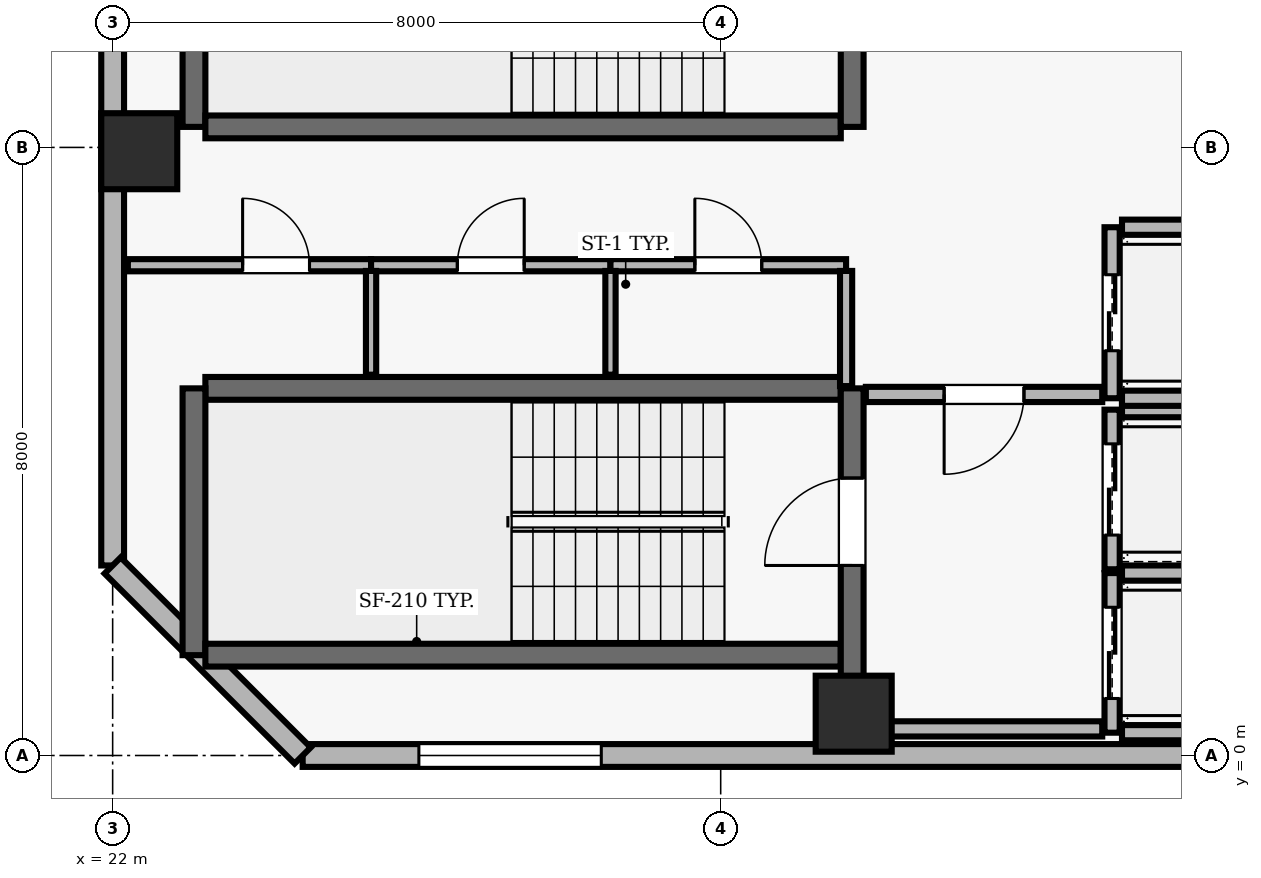
"""IFC4 building model, lengths in metres.
Left out: names, types, materials, properties, quantities, classifications, styles, units other than length and angle.
Written with IfcOpenShell. Run it as: python <this file> out.ifc"""

import sys

from ifc_helpers import new_model, si_unit, direction, frame, frame_2d, origin, origin_2d, place, context, subcontext, project, spatial, rectangle, extrude, element, fill, save


model = new_model("IFC4")
c1 = context("Model", 3, precision=1e-05, world=origin(), true_north=direction((0.0, 1.0)))
c2 = subcontext(c1, "Body", "Model", "MODEL_VIEW")
j1 = project(units=[si_unit("LENGTHUNIT", "METRE"), si_unit("PLANEANGLEUNIT", "RADIAN")], contexts=[c1])
p1 = place(None, origin())
s1 = spatial("IfcSite", under=j1, at=p1, CompositionType="ELEMENT")
p2 = place(p1, origin())
s2 = spatial("IfcBuilding", under=s1, at=p2, CompositionType="ELEMENT")
p3 = place(p2, frame((0.0, 0.0, 214.8)))
s3 = spatial("IfcBuildingStorey", under=s2, at=p3, CompositionType="ELEMENT", Elevation=214.8)
for number, where, z_axis, x_axis in (
    (1, (31.75, 0.55, 0.0), (0.0, 0.0, 1.0), (1.0, 0.0, 0.0)),
    (2, (22.35, 7.95, 0.0), (0.0, 0.0, 1.0), (1.0, 0.0, 0.0)),
):
    element("IfcColumn", number, at=place(p3, frame(where, z_axis=z_axis, x_axis=x_axis)), inside=s3, PredefinedType="COLUMN", context=c2, shape_type="SweptSolid", body=[
        extrude(rectangle(XDim=1.0, YDim=1.0, at=origin_2d()), origin(), (0.0, 0.0, 1.0), 3.9),
    ])
p4 = place(p3, frame((24.5, 0.0, 0.0), z_axis=(0.0, 0.0, 1.0), x_axis=(1.0, 0.0, 0.0)))
e3 = element("IfcWall", 3, at=p4, inside=s3, PredefinedType="SOLIDWALL", context=c2, shape_type="SweptSolid", body=[
    extrude(rectangle(XDim=38.2, YDim=0.3, at=frame_2d((19.1, 0.0))), origin(), (0.0, 0.0, 1.0), 3.69),
])
p5 = place(p4, frame((1.529, 0.0, 0.9)))
e4 = element("IfcOpeningElement", 4, at=p5, cuts=e3, PredefinedType="OPENING", context=c2, shape_type="SweptSolid", body=[
    extrude(rectangle(XDim=2.4, YDim=1.6, at=frame_2d((1.2, 0.8))), frame((0.0, 0.16, 0.0), z_axis=(0.0, -1.0, 0.0), x_axis=(1.0, 0.0, 0.0)), (0.0, 0.0, 1.0), 0.32),
])
p6 = place(p4, frame((17.9, 0.0, 0.9)))
e5 = element("IfcOpeningElement", 5, at=p6, cuts=e3, PredefinedType="OPENING", context=c2, shape_type="SweptSolid", body=[
    extrude(rectangle(XDim=2.4, YDim=1.6, at=frame_2d((1.2, 0.8))), frame((0.0, 0.16, 0.0), z_axis=(0.0, -1.0, 0.0), x_axis=(1.0, 0.0, 0.0)), (0.0, 0.0, 1.0), 0.32),
])
p7 = place(p4, frame((28.814, 0.0, 0.9)))
e6 = element("IfcOpeningElement", 6, at=p7, cuts=e3, PredefinedType="OPENING", context=c2, shape_type="SweptSolid", body=[
    extrude(rectangle(XDim=2.4, YDim=1.6, at=frame_2d((1.2, 0.8))), frame((0.0, 0.16, 0.0), z_axis=(0.0, -1.0, 0.0), x_axis=(1.0, 0.0, 0.0)), (0.0, 0.0, 1.0), 0.32),
])
p8 = place(p4, frame((34.271, 0.0, 0.9)))
e7 = element("IfcOpeningElement", 7, at=p8, cuts=e3, PredefinedType="OPENING", context=c2, shape_type="SweptSolid", body=[
    extrude(rectangle(XDim=2.4, YDim=1.6, at=frame_2d((1.2, 0.8))), frame((0.0, 0.16, 0.0), z_axis=(0.0, -1.0, 0.0), x_axis=(1.0, 0.0, 0.0)), (0.0, 0.0, 1.0), 0.32),
])
p9 = place(p3, frame((22.0, 40.7, 0.0), z_axis=(0.0, 0.0, 1.0), x_axis=(0.0, -1.0, 0.0)))
e8 = element("IfcWall", 8, at=p9, inside=s3, PredefinedType="SOLIDWALL", context=c2, shape_type="SweptSolid", body=[
    extrude(rectangle(XDim=38.2, YDim=0.3, at=frame_2d((19.1, 0.0))), origin(), (0.0, 0.0, 1.0), 3.69),
])
p10 = place(p9, frame((7.8, 0.0, 0.0)))
e9 = element("IfcOpeningElement", 9, at=p10, cuts=e8, PredefinedType="OPENING", context=c2, shape_type="SweptSolid", body=[
    extrude(rectangle(XDim=1.0, YDim=2.2, at=frame_2d((0.5, 1.1))), frame((0.0, 0.16, 0.0), z_axis=(0.0, -1.0, 0.0), x_axis=(1.0, 0.0, 0.0)), (0.0, 0.0, 1.0), 0.32),
])
p11 = place(p9, frame((1.529, 0.0, 0.9)))
e10 = element("IfcOpeningElement", 10, at=p11, cuts=e8, PredefinedType="OPENING", context=c2, shape_type="SweptSolid", body=[
    extrude(rectangle(XDim=2.4, YDim=1.6, at=frame_2d((1.2, 0.8))), frame((0.0, 0.16, 0.0), z_axis=(0.0, -1.0, 0.0), x_axis=(1.0, 0.0, 0.0)), (0.0, 0.0, 1.0), 0.32),
])
p12 = place(p9, frame((11.543, 0.0, 0.9)))
e11 = element("IfcOpeningElement", 11, at=p12, cuts=e8, PredefinedType="OPENING", context=c2, shape_type="SweptSolid", body=[
    extrude(rectangle(XDim=2.4, YDim=1.6, at=frame_2d((1.2, 0.8))), frame((0.0, 0.16, 0.0), z_axis=(0.0, -1.0, 0.0), x_axis=(1.0, 0.0, 0.0)), (0.0, 0.0, 1.0), 0.32),
])
p13 = place(p9, frame((18.35, 0.0, 0.9)))
e12 = element("IfcOpeningElement", 12, at=p13, cuts=e8, PredefinedType="OPENING", context=c2, shape_type="SweptSolid", body=[
    extrude(rectangle(XDim=2.4, YDim=1.6, at=frame_2d((1.2, 0.8))), frame((0.0, 0.16, 0.0), z_axis=(0.0, -1.0, 0.0), x_axis=(1.0, 0.0, 0.0)), (0.0, 0.0, 1.0), 0.32),
])
p14 = place(p9, frame((22.907, 0.0, 0.9)))
e13 = element("IfcOpeningElement", 13, at=p14, cuts=e8, PredefinedType="OPENING", context=c2, shape_type="SweptSolid", body=[
    extrude(rectangle(XDim=2.4, YDim=1.6, at=frame_2d((1.2, 0.8))), frame((0.0, 0.16, 0.0), z_axis=(0.0, -1.0, 0.0), x_axis=(1.0, 0.0, 0.0)), (0.0, 0.0, 1.0), 0.32),
])
p15 = place(p9, frame((28.814, 0.0, 0.9)))
e14 = element("IfcOpeningElement", 14, at=p15, cuts=e8, PredefinedType="OPENING", context=c2, shape_type="SweptSolid", body=[
    extrude(rectangle(XDim=2.4, YDim=1.6, at=frame_2d((1.2, 0.8))), frame((0.0, 0.16, 0.0), z_axis=(0.0, -1.0, 0.0), x_axis=(1.0, 0.0, 0.0)), (0.0, 0.0, 1.0), 0.32),
])
p16 = place(p3, frame((22.0, 2.5, 0.0), z_axis=(0.0, 0.0, 1.0), x_axis=(0.707106781187, -0.707106781187, 0.0)))
e15 = element("IfcWall", 15, at=p16, inside=s3, PredefinedType="SOLIDWALL", context=c2, shape_type="SweptSolid", body=[
    extrude(rectangle(XDim=3.536, YDim=0.3, at=frame_2d((1.768, 0.0))), origin(), (0.0, 0.0, 1.0), 3.69),
])
p17 = place(p3, frame((31.58, 4.83, 0.0), z_axis=(0.0, 0.0, 1.0), x_axis=(-1.0, 0.0, 0.0)))
e16 = element("IfcWall", 16, at=p17, inside=s3, PredefinedType="SHEAR", context=c2, shape_type="SweptSolid", body=[
    extrude(rectangle(XDim=8.36, YDim=0.3, at=frame_2d((4.18, 0.0))), origin(), (0.0, 0.0, 1.0), 3.69),
])
p18 = place(p3, frame((23.07, 4.83, 0.0), z_axis=(0.0, 0.0, 1.0), x_axis=(0.0, -1.0, 0.0)))
e17 = element("IfcWall", 17, at=p18, inside=s3, PredefinedType="SHEAR", context=c2, shape_type="SweptSolid", body=[
    extrude(rectangle(XDim=3.51, YDim=0.3, at=frame_2d((1.755, 0.0))), origin(), (0.0, 0.0, 1.0), 3.69),
])
p19 = place(p3, frame((23.22, 1.32, 0.0), z_axis=(0.0, 0.0, 1.0), x_axis=(1.0, 0.0, 0.0)))
e18 = element("IfcWall", 18, at=p19, inside=s3, PredefinedType="SHEAR", context=c2, shape_type="SweptSolid", body=[
    extrude(rectangle(XDim=8.36, YDim=0.3, at=frame_2d((4.18, 0.0))), origin(), (0.0, 0.0, 1.0), 3.69),
])
p20 = place(p3, frame((31.73, 0.96, 0.0), z_axis=(0.0, 0.0, 1.0), x_axis=(0.0, 1.0, 0.0)))
e19 = element("IfcWall", 19, at=p20, inside=s3, PredefinedType="SHEAR", context=c2, shape_type="SweptSolid", body=[
    extrude(rectangle(XDim=3.87, YDim=0.3, at=frame_2d((1.935, 0.0))), origin(), (0.0, 0.0, 1.0), 3.69),
])
p21 = place(p20, frame((1.54, 0.0, 0.0)))
e20 = element("IfcOpeningElement", 20, at=p21, cuts=e19, PredefinedType="OPENING", context=c2, shape_type="SweptSolid", body=[
    extrude(rectangle(XDim=1.15, YDim=2.15, at=frame_2d((0.575, 1.075))), frame((0.0, 0.16, 0.0), z_axis=(0.0, -1.0, 0.0), x_axis=(1.0, 0.0, 0.0)), (0.0, 0.0, 1.0), 0.32),
])
p22 = place(p3, frame((23.07, 11.78, 0.0), z_axis=(0.0, 0.0, 1.0), x_axis=(0.0, -1.0, 0.0)))
e21 = element("IfcWall", 21, at=p22, inside=s3, PredefinedType="SHEAR", context=c2, shape_type="SweptSolid", body=[
    extrude(rectangle(XDim=3.51, YDim=0.3, at=frame_2d((1.755, 0.0))), origin(), (0.0, 0.0, 1.0), 3.69),
])
p23 = place(p3, frame((23.22, 8.27, 0.0), z_axis=(0.0, 0.0, 1.0), x_axis=(1.0, 0.0, 0.0)))
e22 = element("IfcWall", 22, at=p23, inside=s3, PredefinedType="SHEAR", context=c2, shape_type="SweptSolid", body=[
    extrude(rectangle(XDim=8.36, YDim=0.3, at=frame_2d((4.18, 0.0))), origin(), (0.0, 0.0, 1.0), 3.69),
])
p24 = place(p3, frame((31.73, 8.27, 0.0), z_axis=(0.0, 0.0, 1.0), x_axis=(0.0, 1.0, 0.0)))
e23 = element("IfcWall", 23, at=p24, inside=s3, PredefinedType="SHEAR", context=c2, shape_type="SweptSolid", body=[
    extrude(rectangle(XDim=3.51, YDim=0.3, at=frame_2d((1.755, 0.0))), origin(), (0.0, 0.0, 1.0), 3.69),
])
p25 = place(p24, frame((1.18, 0.0, 0.0)))
e24 = element("IfcOpeningElement", 24, at=p25, cuts=e23, PredefinedType="OPENING", context=c2, shape_type="SweptSolid", body=[
    extrude(rectangle(XDim=1.15, YDim=2.15, at=frame_2d((0.575, 1.075))), frame((0.0, 0.16, 0.0), z_axis=(0.0, -1.0, 0.0), x_axis=(1.0, 0.0, 0.0)), (0.0, 0.0, 1.0), 0.32),
])
p26 = place(p3, frame((35.15, 2.4, 0.0), z_axis=(0.0, 0.0, 1.0), x_axis=(0.0, -1.0, 0.0)))
e25 = element("IfcWall", 25, at=p26, inside=s3, PredefinedType="SOLIDWALL", context=c2, shape_type="SweptSolid", body=[
    extrude(rectangle(XDim=2.1, YDim=0.2, at=frame_2d((1.05, 0.0))), origin(), (0.0, 0.0, 1.0), 3.69),
])
p27 = place(p26, frame((0.45, 0.0, 0.0)))
e26 = element("IfcOpeningElement", 26, at=p27, cuts=e25, PredefinedType="OPENING", context=c2, shape_type="SweptSolid", body=[
    extrude(rectangle(XDim=1.2, YDim=2.15, at=frame_2d((0.6, 1.075))), frame((0.0, 0.11, 0.0), z_axis=(0.0, -1.0, 0.0), x_axis=(1.0, 0.0, 0.0)), (0.0, 0.0, 1.0), 0.22),
])
for number, where, z_axis, x_axis in (
    (27, (35.28, 0.3, 0.0), (0.0, 0.0, 1.0), (1.0, 0.0, 0.0)),
    (28, (37.42, 2.4, 0.0), (0.0, 0.0, 1.0), (-1.0, 0.0, 0.0)),
):
    element("IfcWall", number, at=place(p3, frame(where, z_axis=z_axis, x_axis=x_axis)), inside=s3, PredefinedType="SOLIDWALL", context=c2, shape_type="SweptSolid", body=[
        extrude(rectangle(XDim=2.14, YDim=0.2, at=frame_2d((1.07, 0.0))), origin(), (0.0, 0.0, 1.0), 3.69),
    ])
p28 = place(p3, frame((35.15, 4.55, 0.0), z_axis=(0.0, 0.0, 1.0), x_axis=(0.0, -1.0, 0.0)))
e29 = element("IfcWall", 29, at=p28, inside=s3, PredefinedType="SOLIDWALL", context=c2, shape_type="SweptSolid", body=[
    extrude(rectangle(XDim=2.1, YDim=0.2, at=frame_2d((1.05, 0.0))), origin(), (0.0, 0.0, 1.0), 3.69),
])
p29 = place(p28, frame((0.45, 0.0, 0.0)))
e30 = element("IfcOpeningElement", 30, at=p29, cuts=e29, PredefinedType="OPENING", context=c2, shape_type="SweptSolid", body=[
    extrude(rectangle(XDim=1.2, YDim=2.15, at=frame_2d((0.6, 1.075))), frame((0.0, 0.11, 0.0), z_axis=(0.0, -1.0, 0.0), x_axis=(1.0, 0.0, 0.0)), (0.0, 0.0, 1.0), 0.22),
])
p30 = place(p3, frame((37.42, 4.55, 0.0), z_axis=(0.0, 0.0, 1.0), x_axis=(-1.0, 0.0, 0.0)))
e31 = element("IfcWall", 31, at=p30, inside=s3, PredefinedType="SOLIDWALL", context=c2, shape_type="SweptSolid", body=[
    extrude(rectangle(XDim=2.14, YDim=0.2, at=frame_2d((1.07, 0.0))), origin(), (0.0, 0.0, 1.0), 3.69),
])
p31 = place(p3, frame((35.15, 6.95, 0.0), z_axis=(0.0, 0.0, 1.0), x_axis=(0.0, -1.0, 0.0)))
e32 = element("IfcWall", 32, at=p31, inside=s3, PredefinedType="SOLIDWALL", context=c2, shape_type="SweptSolid", body=[
    extrude(rectangle(XDim=2.25, YDim=0.2, at=frame_2d((1.125, 0.0))), origin(), (0.0, 0.0, 1.0), 3.69),
])
p32 = place(p31, frame((0.625, 0.0, 0.0)))
e33 = element("IfcOpeningElement", 33, at=p32, cuts=e32, PredefinedType="OPENING", context=c2, shape_type="SweptSolid", body=[
    extrude(rectangle(XDim=1.0, YDim=2.1, at=frame_2d((0.5, 1.05))), frame((0.0, 0.11, 0.0), z_axis=(0.0, -1.0, 0.0), x_axis=(1.0, 0.0, 0.0)), (0.0, 0.0, 1.0), 0.22),
])
for number, where, z_axis, x_axis in (
    (34, (35.28, 4.7, 0.0), (0.0, 0.0, 1.0), (1.0, 0.0, 0.0)),
    (35, (37.42, 6.95, 0.0), (0.0, 0.0, 1.0), (-1.0, 0.0, 0.0)),
):
    element("IfcWall", number, at=place(p3, frame(where, z_axis=z_axis, x_axis=x_axis)), inside=s3, PredefinedType="SOLIDWALL", context=c2, shape_type="SweptSolid", body=[
        extrude(rectangle(XDim=2.14, YDim=0.2, at=frame_2d((1.07, 0.0))), origin(), (0.0, 0.0, 1.0), 3.69),
    ])
p33 = place(p3, frame((22.2, 6.45, 0.0), z_axis=(0.0, 0.0, 1.0), x_axis=(1.0, 0.0, 0.0)))
e36 = element("IfcWall", 36, at=p33, inside=s3, PredefinedType="PARTITIONING", context=c2, shape_type="SweptSolid", body=[
    extrude(rectangle(XDim=3.2, YDim=0.16, at=frame_2d((1.6, 0.0))), origin(), (0.0, 0.0, 1.0), 3.69),
])
p34 = place(p33, frame((1.51, 0.0, 0.0)))
e37 = element("IfcOpeningElement", 37, at=p34, cuts=e36, PredefinedType="OPENING", context=c2, shape_type="SweptSolid", body=[
    extrude(rectangle(XDim=0.88, YDim=2.1, at=frame_2d((0.44, 1.05))), frame((0.0, 0.09, 0.0), z_axis=(0.0, -1.0, 0.0), x_axis=(1.0, 0.0, 0.0)), (0.0, 0.0, 1.0), 0.18),
])
p35 = place(p3, frame((25.4, 6.45, 0.0), z_axis=(0.0, 0.0, 1.0), x_axis=(1.0, 0.0, 0.0)))
e38 = element("IfcWall", 38, at=p35, inside=s3, PredefinedType="PARTITIONING", context=c2, shape_type="SweptSolid", body=[
    extrude(rectangle(XDim=3.15, YDim=0.16, at=frame_2d((1.575, 0.0))), origin(), (0.0, 0.0, 1.0), 3.69),
])
p36 = place(p35, frame((1.135, 0.0, 0.0)))
e39 = element("IfcOpeningElement", 39, at=p36, cuts=e38, PredefinedType="OPENING", context=c2, shape_type="SweptSolid", body=[
    extrude(rectangle(XDim=0.88, YDim=2.1, at=frame_2d((0.44, 1.05))), frame((0.0, 0.09, 0.0), z_axis=(0.0, -1.0, 0.0), x_axis=(1.0, 0.0, 0.0)), (0.0, 0.0, 1.0), 0.18),
])
p37 = place(p3, frame((28.55, 6.45, 0.0), z_axis=(0.0, 0.0, 1.0), x_axis=(1.0, 0.0, 0.0)))
e40 = element("IfcWall", 40, at=p37, inside=s3, PredefinedType="PARTITIONING", context=c2, shape_type="SweptSolid", body=[
    extrude(rectangle(XDim=3.1, YDim=0.16, at=frame_2d((1.55, 0.0))), origin(), (0.0, 0.0, 1.0), 3.69),
])
p38 = place(p37, frame((1.11, 0.0, 0.0)))
e41 = element("IfcOpeningElement", 41, at=p38, cuts=e40, PredefinedType="OPENING", context=c2, shape_type="SweptSolid", body=[
    extrude(rectangle(XDim=0.88, YDim=2.1, at=frame_2d((0.44, 1.05))), frame((0.0, 0.09, 0.0), z_axis=(0.0, -1.0, 0.0), x_axis=(1.0, 0.0, 0.0)), (0.0, 0.0, 1.0), 0.18),
])
p39 = place(p3, frame((31.65, 0.35, 0.0), z_axis=(0.0, 0.0, 1.0), x_axis=(1.0, 0.0, 0.0)))
e42 = element("IfcWall", 42, at=p39, inside=s3, PredefinedType="SOLIDWALL", context=c2, shape_type="SweptSolid", body=[
    extrude(rectangle(XDim=3.37, YDim=0.2, at=frame_2d((1.685, 0.0))), origin(), (0.0, 0.0, 1.0), 3.69),
])
p40 = place(p3, frame((35.02, 4.75, 0.0), z_axis=(0.0, 0.0, 1.0), x_axis=(-1.0, 0.0, 0.0)))
e43 = element("IfcWall", 43, at=p40, inside=s3, PredefinedType="SOLIDWALL", context=c2, shape_type="SweptSolid", body=[
    extrude(rectangle(XDim=3.11, YDim=0.2, at=frame_2d((1.555, 0.0))), origin(), (0.0, 0.0, 1.0), 3.69),
])
p41 = place(p40, frame((1.03, 0.0, 0.0)))
e44 = element("IfcOpeningElement", 44, at=p41, cuts=e43, PredefinedType="OPENING", context=c2, shape_type="SweptSolid", body=[
    extrude(rectangle(XDim=1.05, YDim=2.15, at=frame_2d((0.525, 1.075))), frame((0.0, 0.11, 0.0), z_axis=(0.0, -1.0, 0.0), x_axis=(1.0, 0.0, 0.0)), (0.0, 0.0, 1.0), 0.22),
])
for number, where, z_axis, x_axis in (
    (45, (25.4, 5.01, 0.0), (0.0, 0.0, 1.0), (0.0, 1.0, 0.0)),
    (46, (28.55, 5.01, 0.0), (0.0, 0.0, 1.0), (0.0, 1.0, 0.0)),
):
    element("IfcWall", number, at=place(p3, frame(where, z_axis=z_axis, x_axis=x_axis)), inside=s3, PredefinedType="PARTITIONING", context=c2, shape_type="SweptSolid", body=[
        extrude(rectangle(XDim=1.365, YDim=0.135, at=frame_2d((0.683, 0.0))), origin(), (0.0, 0.0, 1.0), 3.69),
    ])
p42 = place(p3, frame((31.65, 4.86, 0.0), z_axis=(0.0, 0.0, 1.0), x_axis=(0.0, 1.0, 0.0)))
e47 = element("IfcWall", 47, at=p42, inside=s3, PredefinedType="PARTITIONING", context=c2, shape_type="SweptSolid", body=[
    extrude(rectangle(XDim=1.515, YDim=0.16, at=frame_2d((0.757, 0.0))), origin(), (0.0, 0.0, 1.0), 3.69),
])
p43 = place(p5, origin())
e48 = element("IfcWindow", 48, at=p43, inside=s3, PartitioningType="SINGLE_PANEL", PredefinedType="WINDOW", context=c2, shape_type="SweptSolid", body=[
    extrude(rectangle(XDim=2.4, YDim=1.6, at=frame_2d((1.2, 0.8))), frame((0.0, 0.03, 0.0), z_axis=(0.0, -1.0, 0.0), x_axis=(1.0, 0.0, 0.0)), (0.0, 0.0, 1.0), 0.06),
])
fill(e4, e48)
p44 = place(p21, origin())
e49 = element("IfcDoor", 49, at=p44, inside=s3, OperationType="SINGLE_SWING_LEFT", PredefinedType="DOOR", context=c2, shape_type="SweptSolid", body=[
    extrude(rectangle(XDim=1.15, YDim=2.15, at=frame_2d((0.575, 1.075))), frame((0.0, 0.025, 0.0), z_axis=(0.0, -1.0, 0.0), x_axis=(1.0, 0.0, 0.0)), (0.0, 0.0, 1.0), 0.05),
])
fill(e20, e49)
p45 = place(p27, origin())
e50 = element("IfcDoor", 50, at=p45, inside=s3, OperationType="DOUBLE_DOOR_SLIDING", PredefinedType="DOOR", context=c2, shape_type="SweptSolid", body=[
    extrude(rectangle(XDim=1.2, YDim=2.15, at=frame_2d((0.6, 1.075))), frame((0.0, 0.025, 0.0), z_axis=(0.0, -1.0, 0.0), x_axis=(1.0, 0.0, 0.0)), (0.0, 0.0, 1.0), 0.05),
])
fill(e26, e50)
p46 = place(p29, origin())
e51 = element("IfcDoor", 51, at=p46, inside=s3, OperationType="DOUBLE_DOOR_SLIDING", PredefinedType="DOOR", context=c2, shape_type="SweptSolid", body=[
    extrude(rectangle(XDim=1.2, YDim=2.15, at=frame_2d((0.6, 1.075))), frame((0.0, 0.025, 0.0), z_axis=(0.0, -1.0, 0.0), x_axis=(1.0, 0.0, 0.0)), (0.0, 0.0, 1.0), 0.05),
])
fill(e30, e51)
p47 = place(p32, origin())
e52 = element("IfcDoor", 52, at=p47, inside=s3, OperationType="DOUBLE_DOOR_SLIDING", PredefinedType="DOOR", context=c2, shape_type="SweptSolid", body=[
    extrude(rectangle(XDim=1.0, YDim=2.1, at=frame_2d((0.5, 1.05))), frame((0.0, 0.025, 0.0), z_axis=(0.0, -1.0, 0.0), x_axis=(1.0, 0.0, 0.0)), (0.0, 0.0, 1.0), 0.05),
])
fill(e33, e52)
p48 = place(p41, origin())
e53 = element("IfcDoor", 53, at=p48, inside=s3, OperationType="SINGLE_SWING_RIGHT", PredefinedType="DOOR", context=c2, shape_type="SweptSolid", body=[
    extrude(rectangle(XDim=1.05, YDim=2.15, at=frame_2d((0.525, 1.075))), frame((0.0, 0.025, 0.0), z_axis=(0.0, -1.0, 0.0), x_axis=(1.0, 0.0, 0.0)), (0.0, 0.0, 1.0), 0.05),
])
fill(e44, e53)
p49 = place(p34, origin())
e54 = element("IfcDoor", 54, at=p49, inside=s3, OperationType="SINGLE_SWING_LEFT", PredefinedType="DOOR", context=c2, shape_type="SweptSolid", body=[
    extrude(rectangle(XDim=0.88, YDim=2.1, at=frame_2d((0.44, 1.05))), frame((0.0, 0.025, 0.0), z_axis=(0.0, -1.0, 0.0), x_axis=(1.0, 0.0, 0.0)), (0.0, 0.0, 1.0), 0.05),
])
fill(e37, e54)
p50 = place(p36, origin())
e55 = element("IfcDoor", 55, at=p50, inside=s3, OperationType="SINGLE_SWING_RIGHT", PredefinedType="DOOR", context=c2, shape_type="SweptSolid", body=[
    extrude(rectangle(XDim=0.88, YDim=2.1, at=frame_2d((0.44, 1.05))), frame((0.0, 0.025, 0.0), z_axis=(0.0, -1.0, 0.0), x_axis=(1.0, 0.0, 0.0)), (0.0, 0.0, 1.0), 0.05),
])
fill(e39, e55)
p51 = place(p38, origin())
e56 = element("IfcDoor", 56, at=p51, inside=s3, OperationType="SINGLE_SWING_LEFT", PredefinedType="DOOR", context=c2, shape_type="SweptSolid", body=[
    extrude(rectangle(XDim=0.88, YDim=2.1, at=frame_2d((0.44, 1.05))), frame((0.0, 0.025, 0.0), z_axis=(0.0, -1.0, 0.0), x_axis=(1.0, 0.0, 0.0)), (0.0, 0.0, 1.0), 0.05),
])
fill(e41, e56)
save(model, sys.argv[1])
